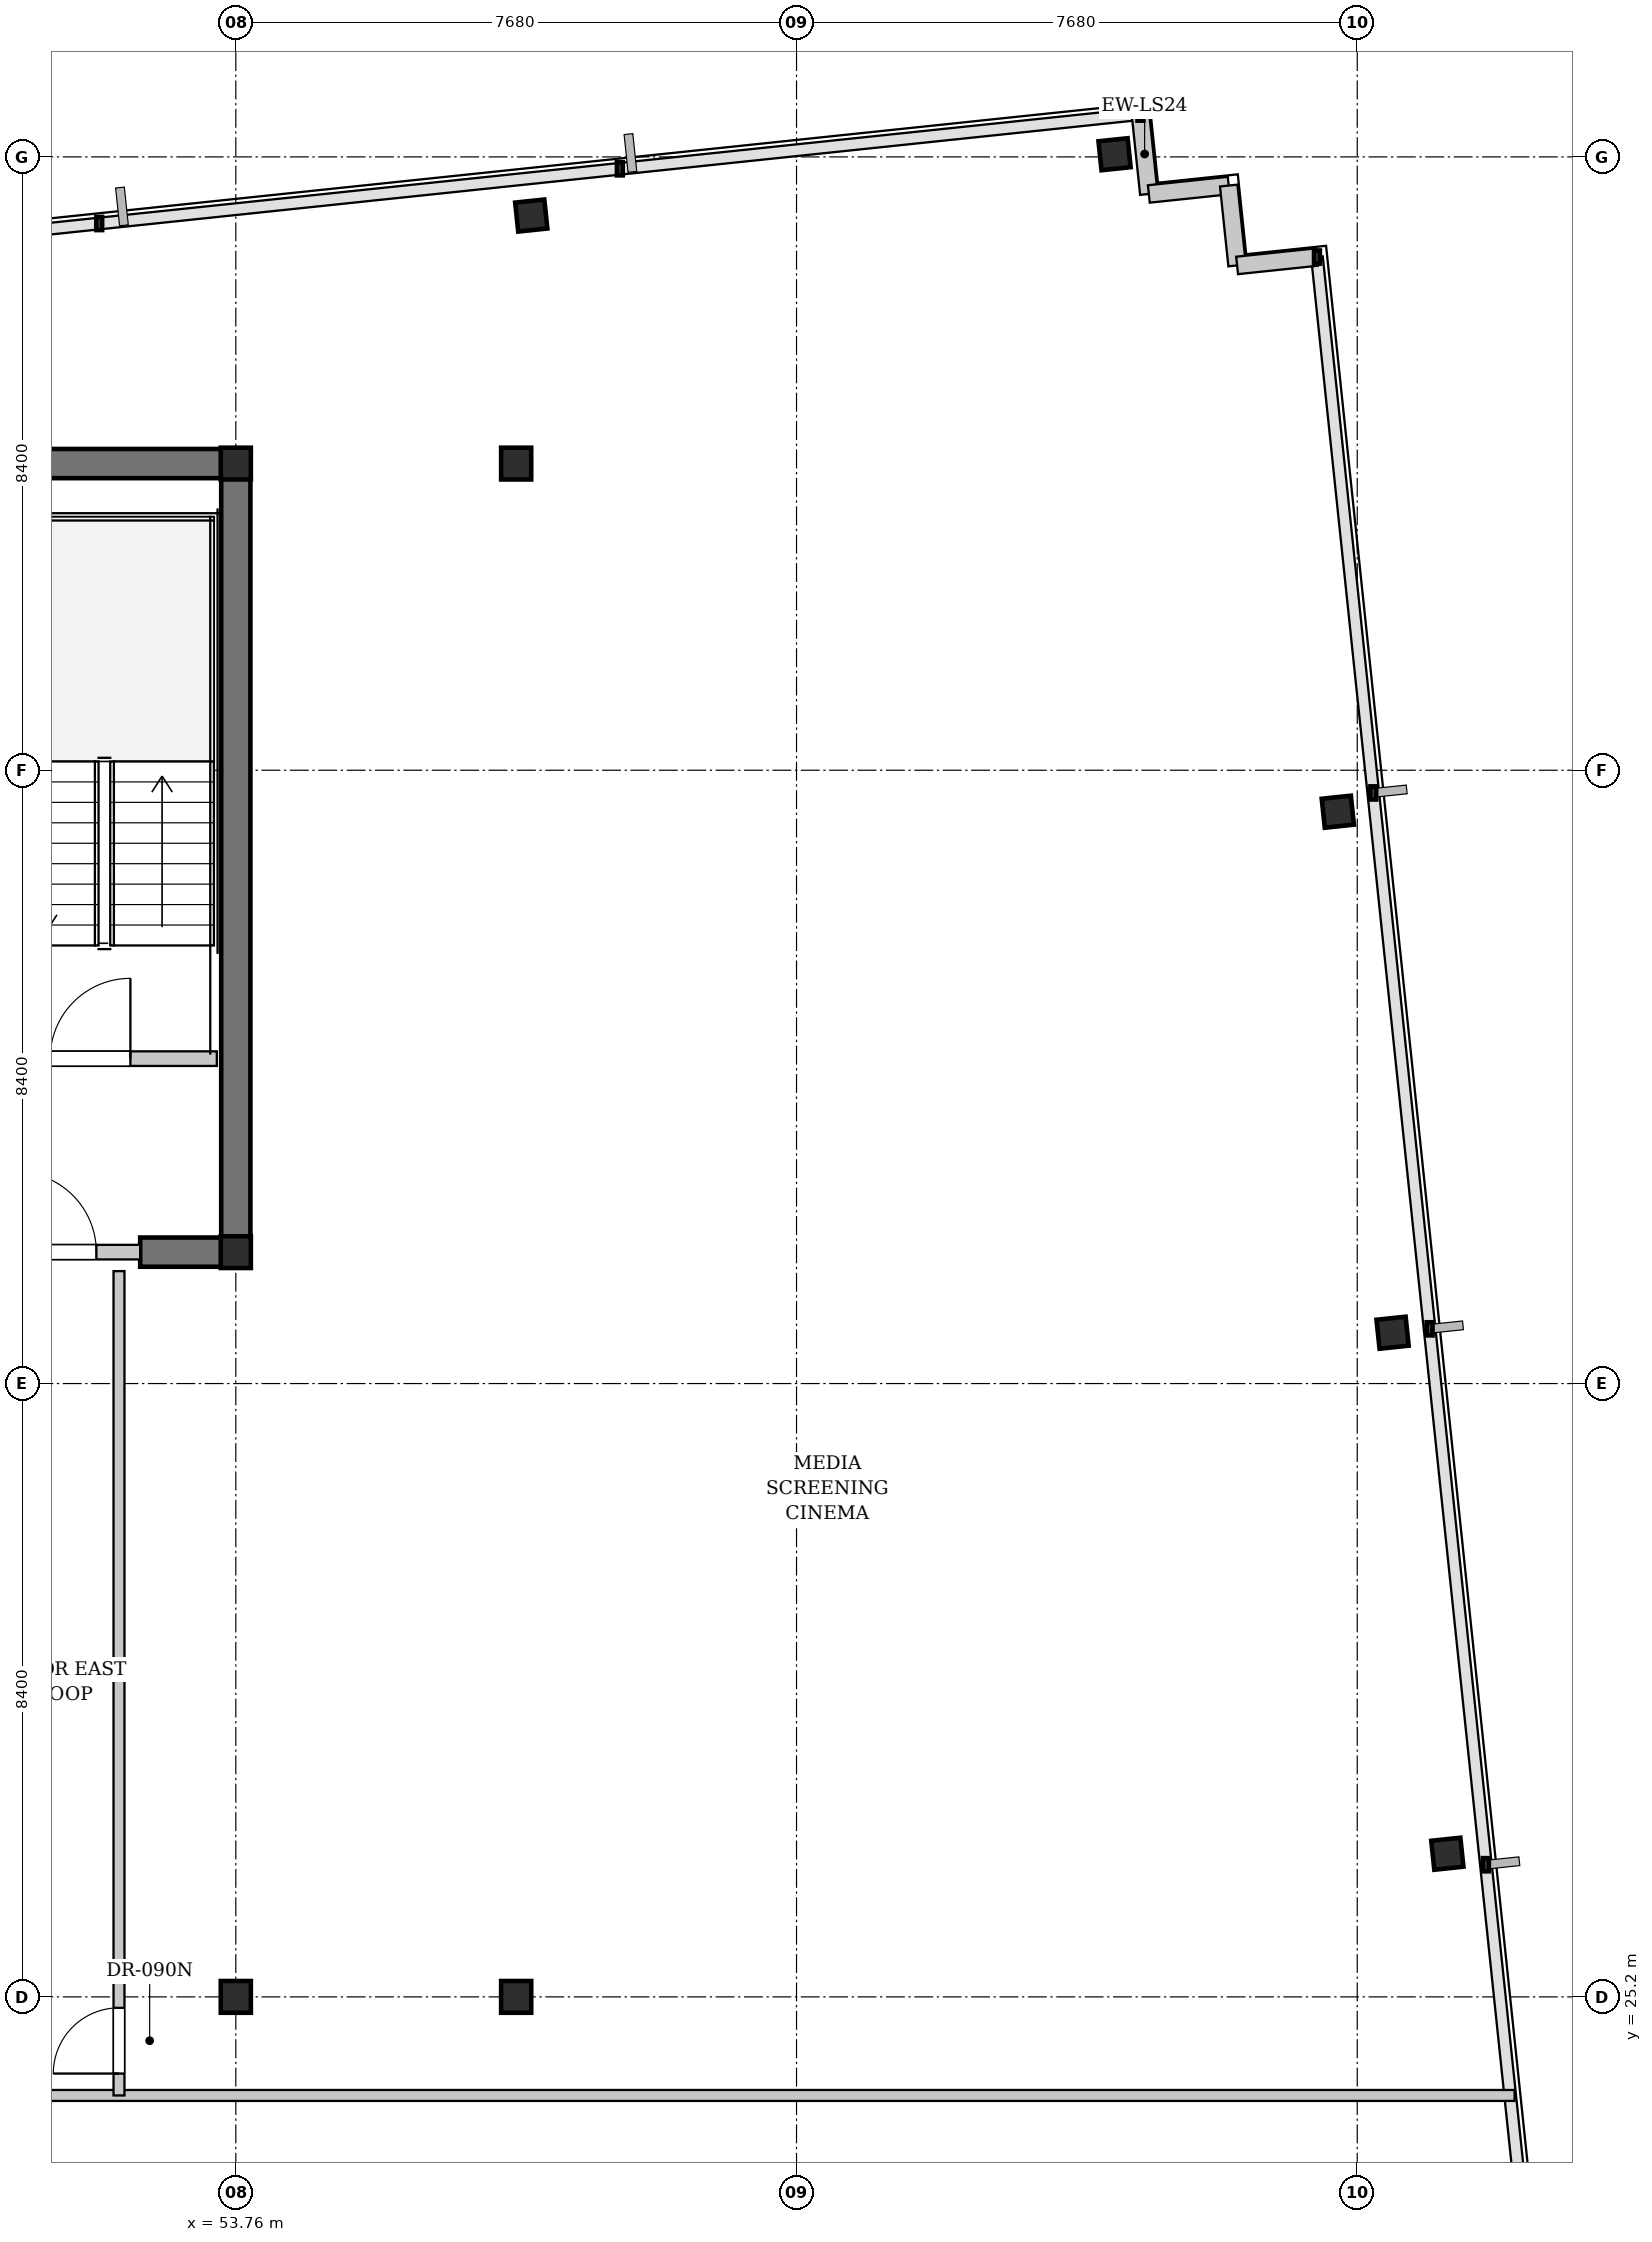
"""IFC4 building model, lengths in metres.
Left out: names, types, materials, properties, quantities, classifications, styles, units other than length and angle.
Written with IfcOpenShell. Run it as: python <this file> out.ifc"""

import sys

from ifc_helpers import new_model, si_unit, direction, frame, frame_2d, origin, origin_2d, place, context, subcontext, project, spatial, rectangle, i_section, extrude, element, fill, save


model = new_model("IFC4")
c1 = context("Model", 3, precision=1e-05, world=origin(), true_north=direction((0.0, 1.0)))
c2 = subcontext(c1, "Body", "Model", "MODEL_VIEW")
j1 = project(units=[si_unit("LENGTHUNIT", "METRE"), si_unit("PLANEANGLEUNIT", "RADIAN")], contexts=[c1])
p1 = place(None, origin())
s1 = spatial("IfcSite", under=j1, at=p1, CompositionType="ELEMENT")
p2 = place(p1, origin())
s2 = spatial("IfcBuilding", under=s1, at=p2, CompositionType="ELEMENT")
p3 = place(p2, frame((0.0, 0.0, 221.0)))
s3 = spatial("IfcBuildingStorey", under=s2, at=p3, CompositionType="ELEMENT", Elevation=221.0)
p4 = place(p3, frame((22.84, 46.2, 0.0), z_axis=(0.0, 0.0, 1.0), x_axis=(1.0, 0.0, 0.0)))
e1 = element("IfcWall", 1, at=p4, inside=s3, PredefinedType="SHEAR", context=c2, shape_type="SweptSolid", body=[
    extrude(rectangle(XDim=31.12, YDim=0.4, at=frame_2d((15.56, 0.0))), origin(), (0.0, 0.0, 1.0), 3.08),
])
p5 = place(p3, frame((52.45, 35.4, 0.0), z_axis=(0.0, 0.0, 1.0), x_axis=(1.0, 0.0, 0.0)))
e2 = element("IfcWall", 2, at=p5, inside=s3, PredefinedType="SHEAR", context=c2, shape_type="SweptSolid", body=[
    extrude(rectangle(XDim=1.51, YDim=0.4, at=frame_2d((0.755, 0.0))), origin(), (0.0, 0.0, 1.0), 3.08),
])
p6 = place(p3, frame((53.76, 35.6, 0.0), z_axis=(0.0, 0.0, 1.0), x_axis=(0.0, 1.0, 0.0)))
e3 = element("IfcWall", 3, at=p6, inside=s3, PredefinedType="SHEAR", context=c2, shape_type="SweptSolid", body=[
    extrude(rectangle(XDim=10.4, YDim=0.4, at=frame_2d((5.2, 0.0))), origin(), (0.0, 0.0, 1.0), 3.08),
])
for number, where, z_axis, x_axis in (
    (4, (53.76, 35.4, 0.0), (0.0, 0.0, 1.0), (1.0, 0.0, 0.0)),
    (5, (53.76, 46.2, 0.0), (0.0, 0.0, 1.0), (1.0, 0.0, 0.0)),
    (6, (53.76, 25.2, 0.0), (0.0, 0.0, 1.0), (1.0, 0.0, 0.0)),
    (7, (57.6, 25.2, 0.0), (0.0, 0.0, 1.0), (1.0, 0.0, 0.0)),
    (8, (57.6, 46.2, 0.0), (0.0, 0.0, 1.0), (1.0, 0.0, 0.0)),
):
    element("IfcColumn", number, at=place(p3, frame(where, z_axis=z_axis, x_axis=x_axis)), inside=s3, PredefinedType="COLUMN", context=c2, shape_type="SweptSolid", body=[
        extrude(i_section(OverallWidth=0.412, OverallDepth=0.435, WebThickness=0.036, FlangeThickness=0.058, FilletRadius=0.015, at=origin_2d()), origin(), (0.0, 0.0, 1.0), 3.3),
    ])
for number, where, z_axis, x_axis in (
    (9, (57.807, 49.597, 0.0), (0.0, 0.0, 1.0), (0.995, 0.105, 0.0)),
    (10, (65.796, 50.437, 0.0), (0.0, 0.0, 1.0), (0.995, 0.105, 0.0)),
    (11, (70.354, 27.16, 0.0), (0.0, 0.0, 1.0), (0.995, 0.105, 0.0)),
    (12, (69.604, 34.296, 0.0), (0.0, 0.0, 1.0), (0.995, 0.105, 0.0)),
    (13, (68.854, 41.432, 0.0), (0.0, 0.0, 1.0), (0.995, 0.105, 0.0)),
):
    element("IfcColumn", number, at=place(p3, frame(where, z_axis=z_axis, x_axis=x_axis)), inside=s3, PredefinedType="COLUMN", context=c2, shape_type="SweptSolid", body=[
        extrude(i_section(OverallWidth=0.401, OverallDepth=0.399, WebThickness=0.025, FlangeThickness=0.04, FilletRadius=0.015, at=origin_2d()), origin(), (0.0, 0.0, 1.0), 3.3),
    ])
for number, where, z_axis, x_axis in (
    (14, (66.15, 50.987, 0.0), (0.0, 0.0, 1.0), (0.105, -0.995, 0.0)),
    (15, (66.265, 49.893, 0.0), (0.0, 0.0, 1.0), (0.995, 0.105, 0.0)),
    (16, (67.359, 50.008, 0.0), (0.0, 0.0, 1.0), (0.105, -0.995, 0.0)),
    (17, (67.474, 48.914, 0.0), (0.0, 0.0, 1.0), (0.995, 0.105, 0.0)),
):
    element("IfcWall", number, at=place(p3, frame(where, z_axis=z_axis, x_axis=x_axis)), inside=s3, PredefinedType="SOLIDWALL", context=c2, shape_type="SweptSolid", body=[
        extrude(rectangle(XDim=1.1, YDim=0.24, at=frame_2d((0.55, 0.0))), origin(), (0.0, 0.0, 1.0), 3.08),
    ])
p7 = place(p3, frame((49.78, 38.05, 0.0), z_axis=(0.0, 0.0, 1.0), x_axis=(1.0, 0.0, 0.0)))
e18 = element("IfcWall", 18, at=p7, inside=s3, PredefinedType="PARTITIONING", context=c2, shape_type="SweptSolid", body=[
    extrude(rectangle(XDim=3.72, YDim=0.2, at=frame_2d((1.86, 0.0))), origin(), (0.0, 0.0, 1.0), 3.08),
])
p8 = place(p7, frame((1.436, 0.0, 0.0)))
e19 = element("IfcOpeningElement", 19, at=p8, cuts=e18, PredefinedType="OPENING", context=c2, shape_type="SweptSolid", body=[
    extrude(rectangle(XDim=1.1, YDim=2.15, at=frame_2d((0.55, 1.075))), frame((0.0, 0.11, 0.0), z_axis=(0.0, -1.0, 0.0), x_axis=(1.0, 0.0, 0.0)), (0.0, 0.0, 1.0), 0.22),
])
p9 = place(p3, frame((50.15, 35.4, 0.0), z_axis=(0.0, 0.0, 1.0), x_axis=(1.0, 0.0, 0.0)))
e20 = element("IfcWall", 20, at=p9, inside=s3, PredefinedType="PARTITIONING", context=c2, shape_type="SweptSolid", body=[
    extrude(rectangle(XDim=2.3, YDim=0.2, at=frame_2d((1.15, 0.0))), origin(), (0.0, 0.0, 1.0), 2.313),
])
p10 = place(p9, frame((0.6, 0.0, 0.0)))
e21 = element("IfcOpeningElement", 21, at=p10, cuts=e20, PredefinedType="OPENING", context=c2, shape_type="SweptSolid", body=[
    extrude(rectangle(XDim=1.1, YDim=2.15, at=frame_2d((0.55, 1.075))), frame((0.0, 0.11, 0.0), z_axis=(0.0, -1.0, 0.0), x_axis=(1.0, 0.0, 0.0)), (0.0, 0.0, 1.0), 0.22),
])
p11 = place(p3, frame((35.62, 23.85, 0.0), z_axis=(0.0, 0.0, 1.0), x_axis=(1.0, 0.0, 0.0)))
e22 = element("IfcWall", 22, at=p11, inside=s3, PredefinedType="PARTITIONING", context=c2, shape_type="SweptSolid", body=[
    extrude(rectangle(XDim=35.655, YDim=0.15, at=frame_2d((17.828, 0.0))), origin(), (0.0, 0.0, 1.0), 3.08),
])
p12 = place(p11, frame((4.299, 0.0, 0.0)))
e23 = element("IfcOpeningElement", 23, at=p12, cuts=e22, PredefinedType="OPENING", context=c2, shape_type="SweptSolid", body=[
    extrude(rectangle(XDim=0.95, YDim=2.15, at=frame_2d((0.475, 1.075))), frame((0.0, 0.085, 0.0), z_axis=(0.0, -1.0, 0.0), x_axis=(1.0, 0.0, 0.0)), (0.0, 0.0, 1.0), 0.17),
])
p13 = place(p11, frame((7.938, 0.0, 0.0)))
e24 = element("IfcOpeningElement", 24, at=p13, cuts=e22, PredefinedType="OPENING", context=c2, shape_type="SweptSolid", body=[
    extrude(rectangle(XDim=0.95, YDim=2.15, at=frame_2d((0.475, 1.075))), frame((0.0, 0.085, 0.0), z_axis=(0.0, -1.0, 0.0), x_axis=(1.0, 0.0, 0.0)), (0.0, 0.0, 1.0), 0.17),
])
p14 = place(p11, frame((13.881, 0.0, 0.0)))
e25 = element("IfcOpeningElement", 25, at=p14, cuts=e22, PredefinedType="OPENING", context=c2, shape_type="SweptSolid", body=[
    extrude(rectangle(XDim=0.95, YDim=2.15, at=frame_2d((0.475, 1.075))), frame((0.0, 0.085, 0.0), z_axis=(0.0, -1.0, 0.0), x_axis=(1.0, 0.0, 0.0)), (0.0, 0.0, 1.0), 0.17),
])
p15 = place(p3, frame((52.16, 23.85, 0.0), z_axis=(0.0, 0.0, 1.0), x_axis=(0.0, 1.0, 0.0)))
e26 = element("IfcWall", 26, at=p15, inside=s3, PredefinedType="PARTITIONING", context=c2, shape_type="SweptSolid", body=[
    extrude(rectangle(XDim=11.29, YDim=0.15, at=frame_2d((5.645, 0.0))), origin(), (0.0, 0.0, 1.0), 3.08),
])
p16 = place(p15, frame((0.3, 0.0, 0.0)))
e27 = element("IfcOpeningElement", 27, at=p16, cuts=e26, PredefinedType="OPENING", context=c2, shape_type="SweptSolid", body=[
    extrude(rectangle(XDim=0.9, YDim=2.15, at=frame_2d((0.45, 1.075))), frame((0.0, 0.085, 0.0), z_axis=(0.0, -1.0, 0.0), x_axis=(1.0, 0.0, 0.0)), (0.0, 0.0, 1.0), 0.17),
])
p17 = place(p8, origin())
e28 = element("IfcDoor", 28, at=p17, inside=s3, OperationType="SINGLE_SWING_RIGHT", PredefinedType="DOOR", context=c2, shape_type="SweptSolid", body=[
    extrude(rectangle(XDim=1.1, YDim=2.15, at=frame_2d((0.55, 1.075))), frame((0.0, 0.025, 0.0), z_axis=(0.0, -1.0, 0.0), x_axis=(1.0, 0.0, 0.0)), (0.0, 0.0, 1.0), 0.05),
])
fill(e19, e28)
p18 = place(p10, origin())
e29 = element("IfcDoor", 29, at=p18, inside=s3, OperationType="SINGLE_SWING_LEFT", PredefinedType="DOOR", context=c2, shape_type="SweptSolid", body=[
    extrude(rectangle(XDim=1.1, YDim=2.15, at=frame_2d((0.55, 1.075))), frame((0.0, 0.025, 0.0), z_axis=(0.0, -1.0, 0.0), x_axis=(1.0, 0.0, 0.0)), (0.0, 0.0, 1.0), 0.05),
])
fill(e21, e29)
p19 = place(p16, origin())
e30 = element("IfcDoor", 30, at=p19, inside=s3, OperationType="SINGLE_SWING_LEFT", PredefinedType="DOOR", context=c2, shape_type="SweptSolid", body=[
    extrude(rectangle(XDim=0.9, YDim=2.15, at=frame_2d((0.45, 1.075))), frame((0.0, 0.025, 0.0), z_axis=(0.0, -1.0, 0.0), x_axis=(1.0, 0.0, 0.0)), (0.0, 0.0, 1.0), 0.05),
])
fill(e27, e30)
save(model, sys.argv[1])
